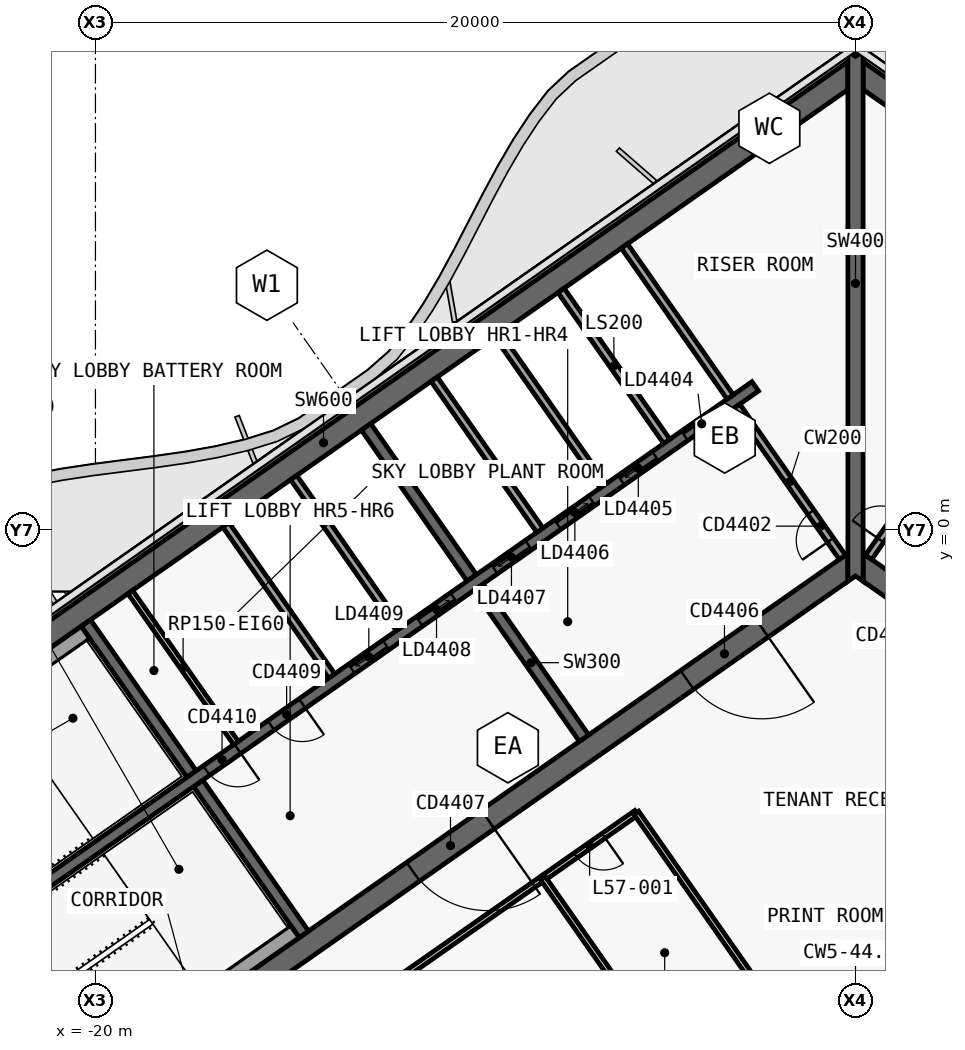
"""IFC4 building model, lengths in metres.
Left out: names, types, materials, properties, quantities, classifications, styles, units other than length and angle.
Written with IfcOpenShell. Run it as: python <this file> out.ifc"""

import sys

from ifc_helpers import new_model, si_unit, direction, frame, frame_2d, origin, place, context, subcontext, project, spatial, polyline, rectangle, outline, extrude, element, fill, save


model = new_model("IFC4")
c1 = context("Model", 3, precision=1e-05, world=origin(), true_north=direction((0.0, 1.0)))
c2 = subcontext(c1, "Body", "Model", "MODEL_VIEW")
j1 = project(units=[si_unit("LENGTHUNIT", "METRE"), si_unit("PLANEANGLEUNIT", "RADIAN")], contexts=[c1])
p1 = place(None, origin())
s1 = spatial("IfcSite", under=j1, at=p1, CompositionType="ELEMENT")
p2 = place(p1, origin())
s2 = spatial("IfcBuilding", under=s1, at=p2, CompositionType="ELEMENT")
p3 = place(p2, frame((0.0, 0.0, 244.9)))
s3 = spatial("IfcBuildingStorey", under=s2, at=p3, CompositionType="ELEMENT", Elevation=244.9)
p4 = place(p3, frame((-0.028, 12.066, 0.0), z_axis=(0.0, 0.0, 1.0), x_axis=(-0.819151382952, -0.573577380837, 0.0)))
e1 = element("IfcWall", 1, at=p4, inside=s3, PredefinedType="SHEAR", context=c2, shape_type="SweptSolid", body=[
    extrude(outline(polyline([(33.898, 0.3), (0.42, 0.3), (0.0, -0.3), (33.898, -0.3), (33.898, 0.3)])), origin(), (0.0, 0.0, 1.0), 3.9),
])
p5 = place(p3, frame((-0.028, -0.874, 0.0), z_axis=(0.0, 0.0, 1.0), x_axis=(-0.819150035022, -0.573579305871, 0.0)))
e2 = element("IfcWall", 2, at=p5, inside=s3, PredefinedType="SHEAR", context=c2, shape_type="SweptSolid", body=[
    extrude(outline(polyline([(26.476, 0.3), (0.42, 0.3), (0.0, -0.3), (26.476, -0.3), (26.476, 0.3)])), origin(), (0.0, 0.0, 1.0), 3.9),
])
p6 = place(p5, frame((2.976, 0.0, 0.0)))
e3 = element("IfcOpeningElement", 3, at=p6, cuts=e2, PredefinedType="OPENING", context=c2, shape_type="SweptSolid", body=[
    extrude(rectangle(XDim=2.4, YDim=2.1, at=frame_2d((1.2, 1.05))), frame((0.0, 0.31, 0.0), z_axis=(0.0, -1.0, 0.0), x_axis=(1.0, 0.0, 0.0)), (0.0, 0.0, 1.0), 0.62),
])
p7 = place(p5, frame((11.776, 0.0, 0.0)))
e4 = element("IfcOpeningElement", 4, at=p7, cuts=e2, PredefinedType="OPENING", context=c2, shape_type="SweptSolid", body=[
    extrude(rectangle(XDim=2.4, YDim=2.1, at=frame_2d((1.2, 1.05))), frame((0.0, 0.31, 0.0), z_axis=(0.0, -1.0, 0.0), x_axis=(1.0, 0.0, 0.0)), (0.0, 0.0, 1.0), 0.62),
])
p8 = place(p3, frame((-7.143, -5.49, 0.0), z_axis=(0.0, 0.0, 1.0), x_axis=(-0.573617744349, 0.819123118565, 0.0)))
e5 = element("IfcWall", 5, at=p8, inside=s3, PredefinedType="SHEAR", context=c2, shape_type="SweptSolid", body=[
    extrude(outline(polyline([(4.85, 0.15), (0.0, 0.15), (0.0, -0.15), (4.85, -0.15), (4.85, 0.15)])), origin(), (0.0, 0.0, 1.0), 3.9),
])
p9 = place(p3, frame((-10.097, -1.271, 0.0), z_axis=(0.0, 0.0, 1.0), x_axis=(-0.573560315113, 0.819163332265, 0.0)))
e6 = element("IfcWall", 6, at=p9, inside=s3, PredefinedType="SHEAR", context=c2, shape_type="SweptSolid", body=[
    extrude(outline(polyline([(4.85, -0.15), (4.85, 0.15), (0.0, 0.15), (0.0, -0.15), (4.85, -0.15)])), origin(), (0.0, 0.0, 1.0), 3.9),
])
p10 = place(p3, frame((-14.515, -10.652, 0.0), z_axis=(0.0, 0.0, 1.0), x_axis=(-0.573560315113, 0.819163332265, 0.0)))
e7 = element("IfcWall", 7, at=p10, inside=s3, PredefinedType="SHEAR", context=c2, shape_type="SweptSolid", body=[
    extrude(outline(polyline([(4.85, 0.15), (0.0, 0.15), (0.0, -0.15), (4.85, -0.15), (4.85, 0.15)])), origin(), (0.0, 0.0, 1.0), 3.9),
])
p11 = place(p3, frame((-17.469, -6.433, 0.0), z_axis=(0.0, 0.0, 1.0), x_axis=(-0.573594092424, 0.81913968109, 0.0)))
e8 = element("IfcWall", 8, at=p11, inside=s3, PredefinedType="SHEAR", context=c2, shape_type="SweptSolid", body=[
    extrude(outline(polyline([(4.85, -0.15), (4.85, 0.15), (0.0, 0.15), (0.0, -0.15), (4.85, -0.15)])), origin(), (0.0, 0.0, 1.0), 3.9),
])
p12 = place(p3, frame((-2.638, 3.768, 0.0), z_axis=(0.0, 0.0, 1.0), x_axis=(-0.819155014212, -0.573572194837, 0.0)))
e9 = element("IfcWall", 9, at=p12, inside=s3, PredefinedType="SHEAR", context=c2, shape_type="SweptSolid", body=[
    extrude(outline(polyline([(26.4, 0.15), (0.0, 0.15), (0.0, -0.15), (26.4, -0.15), (26.4, 0.15)])), origin(), (0.0, 0.0, 1.0), 3.9),
])
p13 = place(p12, frame((1.169, 0.0, 0.0)))
e10 = element("IfcOpeningElement", 10, at=p13, cuts=e9, PredefinedType="OPENING", context=c2, shape_type="SweptSolid", body=[
    extrude(rectangle(XDim=1.1, YDim=2.1, at=frame_2d((0.55, 1.05))), frame((0.0, 0.16, 0.0), z_axis=(0.0, -1.0, 0.0), x_axis=(1.0, 0.0, 0.0)), (0.0, 0.0, 1.0), 0.32),
])
p14 = place(p12, frame((3.206, 0.0, 0.0)))
e11 = element("IfcOpeningElement", 11, at=p14, cuts=e9, PredefinedType="OPENING", context=c2, shape_type="SweptSolid", body=[
    extrude(rectangle(XDim=1.1, YDim=2.1, at=frame_2d((0.55, 1.05))), frame((0.0, 0.16, 0.0), z_axis=(0.0, -1.0, 0.0), x_axis=(1.0, 0.0, 0.0)), (0.0, 0.0, 1.0), 0.32),
])
p15 = place(p12, frame((5.244, 0.0, 0.0)))
e12 = element("IfcOpeningElement", 12, at=p15, cuts=e9, PredefinedType="OPENING", context=c2, shape_type="SweptSolid", body=[
    extrude(rectangle(XDim=1.1, YDim=2.1, at=frame_2d((0.55, 1.05))), frame((0.0, 0.16, 0.0), z_axis=(0.0, -1.0, 0.0), x_axis=(1.0, 0.0, 0.0)), (0.0, 0.0, 1.0), 0.32),
])
p16 = place(p12, frame((7.281, 0.0, 0.0)))
e13 = element("IfcOpeningElement", 13, at=p16, cuts=e9, PredefinedType="OPENING", context=c2, shape_type="SweptSolid", body=[
    extrude(rectangle(XDim=1.1, YDim=2.1, at=frame_2d((0.55, 1.05))), frame((0.0, 0.16, 0.0), z_axis=(0.0, -1.0, 0.0), x_axis=(1.0, 0.0, 0.0)), (0.0, 0.0, 1.0), 0.32),
])
p17 = place(p12, frame((9.688, 0.0, 0.0)))
e14 = element("IfcOpeningElement", 14, at=p17, cuts=e9, PredefinedType="OPENING", context=c2, shape_type="SweptSolid", body=[
    extrude(rectangle(XDim=1.1, YDim=2.1, at=frame_2d((0.55, 1.05))), frame((0.0, 0.16, 0.0), z_axis=(0.0, -1.0, 0.0), x_axis=(1.0, 0.0, 0.0)), (0.0, 0.0, 1.0), 0.32),
])
p18 = place(p12, frame((11.863, 0.0, 0.0)))
e15 = element("IfcOpeningElement", 15, at=p18, cuts=e9, PredefinedType="OPENING", context=c2, shape_type="SweptSolid", body=[
    extrude(rectangle(XDim=1.1, YDim=2.1, at=frame_2d((0.55, 1.05))), frame((0.0, 0.16, 0.0), z_axis=(0.0, -1.0, 0.0), x_axis=(1.0, 0.0, 0.0)), (0.0, 0.0, 1.0), 0.32),
])
p19 = place(p12, frame((14.552, 0.0, 0.0)))
e16 = element("IfcOpeningElement", 16, at=p19, cuts=e9, PredefinedType="OPENING", context=c2, shape_type="SweptSolid", body=[
    extrude(rectangle(XDim=1.0, YDim=2.1, at=frame_2d((0.5, 1.05))), frame((0.0, 0.16, 0.0), z_axis=(0.0, -1.0, 0.0), x_axis=(1.0, 0.0, 0.0)), (0.0, 0.0, 1.0), 0.32),
])
p20 = place(p12, frame((16.627, 0.0, 0.0)))
e17 = element("IfcOpeningElement", 17, at=p20, cuts=e9, PredefinedType="OPENING", context=c2, shape_type="SweptSolid", body=[
    extrude(rectangle(XDim=1.0, YDim=2.1, at=frame_2d((0.5, 1.05))), frame((0.0, 0.16, 0.0), z_axis=(0.0, -1.0, 0.0), x_axis=(1.0, 0.0, 0.0)), (0.0, 0.0, 1.0), 0.32),
])
p21 = place(p3, frame((0.028, 12.066, 0.0), z_axis=(0.0, 0.0, 1.0), x_axis=(0.819151382952, -0.573577380837, 0.0)))
e18 = element("IfcWall", 18, at=p21, inside=s3, PredefinedType="SHEAR", context=c2, shape_type="SweptSolid", body=[
    extrude(outline(polyline([(33.898, 0.3), (0.0, 0.3), (0.42, -0.3), (33.898, -0.3), (33.898, 0.3)])), origin(), (0.0, 0.0, 1.0), 3.9),
])
p22 = place(p3, frame((0.028, -0.874, 0.0), z_axis=(0.0, 0.0, 1.0), x_axis=(0.819150035022, -0.573579305871, 0.0)))
e19 = element("IfcWall", 19, at=p22, inside=s3, PredefinedType="SHEAR", context=c2, shape_type="SweptSolid", body=[
    extrude(outline(polyline([(26.476, 0.3), (0.0, 0.3), (0.42, -0.3), (26.476, -0.3), (26.476, 0.3)])), origin(), (0.0, 0.0, 1.0), 3.9),
])
p23 = place(p22, frame((6.576, 0.0, 0.0)))
e20 = element("IfcOpeningElement", 20, at=p23, cuts=e19, PredefinedType="OPENING", context=c2, shape_type="SweptSolid", body=[
    extrude(rectangle(XDim=1.5, YDim=2.1, at=frame_2d((0.75, 1.05))), frame((0.0, 0.31, 0.0), z_axis=(0.0, -1.0, 0.0), x_axis=(1.0, 0.0, 0.0)), (0.0, 0.0, 1.0), 0.62),
])
p24 = place(p22, frame((12.226, 0.0, 0.0)))
e21 = element("IfcOpeningElement", 21, at=p24, cuts=e19, PredefinedType="OPENING", context=c2, shape_type="SweptSolid", body=[
    extrude(rectangle(XDim=1.5, YDim=2.1, at=frame_2d((0.75, 1.05))), frame((0.0, 0.31, 0.0), z_axis=(0.0, -1.0, 0.0), x_axis=(1.0, 0.0, 0.0)), (0.0, 0.0, 1.0), 0.62),
])
p25 = place(p3, frame((0.0, -1.361, 0.0), z_axis=(0.0, 0.0, 1.0), x_axis=(0.0, 1.0, 0.0)))
e22 = element("IfcWall", 22, at=p25, inside=s3, PredefinedType="SHEAR", context=c2, shape_type="SweptSolid", body=[
    extrude(outline(polyline([(0.14, 0.2), (0.0, 0.2), (0.14, 0.0), (0.0, -0.2), (0.14, -0.2), (1.012, -0.2), (12.94, -0.2), (13.813, -0.2), (13.893, -0.2), (13.933, -0.172), (13.813, 0.0), (13.933, 0.172), (13.893, 0.2), (13.813, 0.2), (12.94, 0.2), (1.012, 0.2), (0.14, 0.2)])), origin(), (0.0, 0.0, 1.0), 3.9),
])
p26 = place(p3, frame((-4.967, 2.321, 0.0), z_axis=(0.0, 0.0, 1.0), x_axis=(-0.573594092424, 0.81913968109, 0.0)))
e23 = element("IfcWall", 23, at=p26, inside=s3, PredefinedType="SOLIDWALL", context=c2, shape_type="SweptSolid", body=[
    extrude(rectangle(XDim=4.85, YDim=0.2, at=frame_2d((2.425, 0.0))), origin(), (0.0, 0.0, 1.0), 3.9),
])
p27 = place(p3, frame((-6.636, 1.152, 0.0), z_axis=(0.0, 0.0, 1.0), x_axis=(-0.573560315113, 0.819163332265, 0.0)))
e24 = element("IfcWall", 24, at=p27, inside=s3, PredefinedType="SOLIDWALL", context=c2, shape_type="SweptSolid", body=[
    extrude(rectangle(XDim=4.85, YDim=0.2, at=frame_2d((2.425, 0.0))), origin(), (0.0, 0.0, 1.0), 3.9),
])
p28 = place(p3, frame((-8.305, -0.017, 0.0), z_axis=(0.0, 0.0, 1.0), x_axis=(-0.573594092424, 0.81913968109, 0.0)))
e25 = element("IfcWall", 25, at=p28, inside=s3, PredefinedType="SOLIDWALL", context=c2, shape_type="SweptSolid", body=[
    extrude(rectangle(XDim=4.85, YDim=0.2, at=frame_2d((2.425, 0.0))), origin(), (0.0, 0.0, 1.0), 3.9),
])
p29 = place(p3, frame((-16.302, -5.616, 0.0), z_axis=(0.0, 0.0, 1.0), x_axis=(-0.573560315113, 0.819163332265, 0.0)))
e26 = element("IfcWall", 26, at=p29, inside=s3, PredefinedType="PARTITIONING", context=c2, shape_type="SweptSolid", body=[
    extrude(rectangle(XDim=4.85, YDim=0.15, at=frame_2d((2.425, 0.0))), origin(), (0.0, 0.0, 1.0), 3.62),
])
p30 = place(p3, frame((-12.001, -2.605, 0.0), z_axis=(0.0, 0.0, 1.0), x_axis=(-0.573560315113, 0.819163332265, 0.0)))
e27 = element("IfcWall", 27, at=p30, inside=s3, PredefinedType="SOLIDWALL", context=c2, shape_type="SweptSolid", body=[
    extrude(rectangle(XDim=4.85, YDim=0.2, at=frame_2d((2.425, 0.0))), origin(), (0.0, 0.0, 1.0), 3.9),
])
p31 = place(p3, frame((-13.783, -3.852, 0.0), z_axis=(0.0, 0.0, 1.0), x_axis=(-0.573594092424, 0.81913968109, 0.0)))
e28 = element("IfcWall", 28, at=p31, inside=s3, PredefinedType="SOLIDWALL", context=c2, shape_type="SweptSolid", body=[
    extrude(rectangle(XDim=4.85, YDim=0.2, at=frame_2d((2.425, 0.0))), origin(), (0.0, 0.0, 1.0), 3.9),
])
p32 = place(p3, frame((-20.259, -2.71, 0.0), z_axis=(0.0, 0.0, 1.0), x_axis=(-0.81914849389, -0.573581506813, 0.0)))
e29 = element("IfcWall", 29, at=p32, inside=s3, PredefinedType="SOLIDWALL", context=c2, shape_type="SweptSolid", body=[
    extrude(rectangle(XDim=8.25, YDim=0.4, at=frame_2d((4.125, 0.0))), origin(), (0.0, 0.0, 1.0), 3.62),
])
p33 = place(p3, frame((-14.753, -10.574, 0.0), z_axis=(0.0, 0.0, 1.0), x_axis=(-0.819158229677, -0.573567602601, 0.0)))
e30 = element("IfcWall", 30, at=p33, inside=s3, PredefinedType="SOLIDWALL", context=c2, shape_type="SweptSolid", body=[
    extrude(rectangle(XDim=8.25, YDim=0.4, at=frame_2d((4.125, 0.0))), origin(), (0.0, 0.0, 1.0), 3.62),
])
p34 = place(p3, frame((-0.344, -0.729, 0.0), z_axis=(0.0, 0.0, 1.0), x_axis=(-0.573560315113, 0.819163332265, 0.0)))
e31 = element("IfcWall", 31, at=p34, inside=s3, PredefinedType="SOLIDWALL", context=c2, shape_type="SweptSolid", body=[
    extrude(rectangle(XDim=4.85, YDim=0.2, at=frame_2d((2.425, 0.0))), origin(), (0.0, 0.0, 1.0), 3.62),
])
p35 = place(p34, frame((0.55, 0.0, 0.0)))
e32 = element("IfcOpeningElement", 32, at=p35, cuts=e31, PredefinedType="OPENING", context=c2, shape_type="SweptSolid", body=[
    extrude(rectangle(XDim=0.9, YDim=2.1, at=frame_2d((0.45, 1.05))), frame((0.0, 0.11, 0.0), z_axis=(0.0, -1.0, 0.0), x_axis=(1.0, 0.0, 0.0)), (0.0, 0.0, 1.0), 0.22),
])
p36 = place(p3, frame((-3.298, 3.49, 0.0), z_axis=(0.0, 0.0, 1.0), x_axis=(-0.573560315113, 0.819163332265, 0.0)))
e33 = element("IfcWall", 33, at=p36, inside=s3, PredefinedType="SOLIDWALL", context=c2, shape_type="SweptSolid", body=[
    extrude(rectangle(XDim=4.85, YDim=0.2, at=frame_2d((2.425, 0.0))), origin(), (0.0, 0.0, 1.0), 3.62),
])
p37 = place(p3, frame((0.344, -0.729, 0.0), z_axis=(0.0, 0.0, 1.0), x_axis=(0.573560315113, 0.819163332265, 0.0)))
e34 = element("IfcWall", 34, at=p37, inside=s3, PredefinedType="SOLIDWALL", context=c2, shape_type="SweptSolid", body=[
    extrude(rectangle(XDim=4.85, YDim=0.2, at=frame_2d((2.425, 0.0))), origin(), (0.0, 0.0, 1.0), 3.62),
])
p38 = place(p37, frame((0.55, 0.0, 0.0)))
e35 = element("IfcOpeningElement", 35, at=p38, cuts=e34, PredefinedType="OPENING", context=c2, shape_type="SweptSolid", body=[
    extrude(rectangle(XDim=0.9, YDim=2.1, at=frame_2d((0.45, 1.05))), frame((0.0, 0.11, 0.0), z_axis=(0.0, -1.0, 0.0), x_axis=(1.0, 0.0, 0.0)), (0.0, 0.0, 1.0), 0.22),
])
p39 = place(p3, frame((-5.766, -7.456, 0.0), z_axis=(0.0, 0.0, 1.0), x_axis=(-0.81915932427, -0.57356603932, 0.0)))
e36 = element("IfcWall", 36, at=p39, inside=s3, PredefinedType="PARTITIONING", context=c2, shape_type="SweptSolid", body=[
    extrude(rectangle(XDim=3.002, YDim=0.15, at=frame_2d((1.501, 0.0))), origin(), (0.0, 0.0, 1.0), 3.05),
])
p40 = place(p39, frame((1.051, 0.0, 0.0)))
e37 = element("IfcOpeningElement", 37, at=p40, cuts=e36, PredefinedType="OPENING", context=c2, shape_type="SweptSolid", body=[
    extrude(rectangle(XDim=0.9, YDim=2.1, at=frame_2d((0.45, 1.05))), frame((0.0, 0.085, 0.0), z_axis=(0.0, -1.0, 0.0), x_axis=(1.0, 0.0, 0.0)), (0.0, 0.0, 1.0), 0.17),
])
p41 = place(p3, frame((-8.222, -9.175, 0.0), z_axis=(0.0, 0.0, 1.0), x_axis=(-0.81915329441, -0.573574650989, 0.0)))
e38 = element("IfcWall", 38, at=p41, inside=s3, PredefinedType="PARTITIONING", context=c2, shape_type="SweptSolid", body=[
    extrude(rectangle(XDim=10.504, YDim=0.15, at=frame_2d((5.252, 0.0))), origin(), (0.0, 0.0, 1.0), 3.05),
])
p42 = place(p41, frame((4.452, 0.0, 0.0)))
e39 = element("IfcOpeningElement", 39, at=p42, cuts=e38, PredefinedType="OPENING", context=c2, shape_type="SweptSolid", body=[
    extrude(rectangle(XDim=1.6, YDim=2.1, at=frame_2d((0.8, 1.05))), frame((0.0, 0.085, 0.0), z_axis=(0.0, -1.0, 0.0), x_axis=(1.0, 0.0, 0.0)), (0.0, 0.0, 1.0), 0.17),
])
p43 = place(p3, frame((-1.849, -13.051, 0.0), z_axis=(0.0, 0.0, 1.0), x_axis=(-0.57357985571, 0.819149650018, 0.0)))
e40 = element("IfcWall", 40, at=p43, inside=s3, PredefinedType="PARTITIONING", context=c2, shape_type="SweptSolid", body=[
    extrude(rectangle(XDim=6.832, YDim=0.15, at=frame_2d((3.416, 0.0))), origin(), (0.0, 0.0, 1.0), 3.05),
])
p44 = place(p3, frame((-5.928, -12.455, 0.0), z_axis=(0.0, 0.0, 1.0), x_axis=(-0.573560601885, 0.819163131473, 0.0)))
e41 = element("IfcWall", 41, at=p44, inside=s3, PredefinedType="PARTITIONING", context=c2, shape_type="SweptSolid", body=[
    extrude(rectangle(XDim=4.002, YDim=0.15, at=frame_2d((2.001, 0.0))), origin(), (0.0, 0.0, 1.0), 3.62),
])
p45 = place(p13, origin())
e42 = element("IfcDoor", 42, at=p45, inside=s3, OperationType="SLIDING_TO_LEFT", PredefinedType="DOOR", context=c2, shape_type="SweptSolid", body=[
    extrude(rectangle(XDim=1.1, YDim=2.1, at=frame_2d((0.55, 1.05))), frame((0.0, 0.025, 0.0), z_axis=(0.0, -1.0, 0.0), x_axis=(1.0, 0.0, 0.0)), (0.0, 0.0, 1.0), 0.05),
])
fill(e10, e42)
p46 = place(p14, origin())
e43 = element("IfcDoor", 43, at=p46, inside=s3, OperationType="SLIDING_TO_RIGHT", PredefinedType="DOOR", context=c2, shape_type="SweptSolid", body=[
    extrude(rectangle(XDim=1.1, YDim=2.1, at=frame_2d((0.55, 1.05))), frame((0.0, 0.025, 0.0), z_axis=(0.0, -1.0, 0.0), x_axis=(1.0, 0.0, 0.0)), (0.0, 0.0, 1.0), 0.05),
])
fill(e11, e43)
p47 = place(p15, origin())
e44 = element("IfcDoor", 44, at=p47, inside=s3, OperationType="SLIDING_TO_LEFT", PredefinedType="DOOR", context=c2, shape_type="SweptSolid", body=[
    extrude(rectangle(XDim=1.1, YDim=2.1, at=frame_2d((0.55, 1.05))), frame((0.0, 0.025, 0.0), z_axis=(0.0, -1.0, 0.0), x_axis=(1.0, 0.0, 0.0)), (0.0, 0.0, 1.0), 0.05),
])
fill(e12, e44)
p48 = place(p16, origin())
e45 = element("IfcDoor", 45, at=p48, inside=s3, OperationType="SLIDING_TO_RIGHT", PredefinedType="DOOR", context=c2, shape_type="SweptSolid", body=[
    extrude(rectangle(XDim=1.1, YDim=2.1, at=frame_2d((0.55, 1.05))), frame((0.0, 0.025, 0.0), z_axis=(0.0, -1.0, 0.0), x_axis=(1.0, 0.0, 0.0)), (0.0, 0.0, 1.0), 0.05),
])
fill(e13, e45)
p49 = place(p17, origin())
e46 = element("IfcDoor", 46, at=p49, inside=s3, OperationType="SLIDING_TO_LEFT", PredefinedType="DOOR", context=c2, shape_type="SweptSolid", body=[
    extrude(rectangle(XDim=1.1, YDim=2.1, at=frame_2d((0.55, 1.05))), frame((0.0, 0.025, 0.0), z_axis=(0.0, -1.0, 0.0), x_axis=(1.0, 0.0, 0.0)), (0.0, 0.0, 1.0), 0.05),
])
fill(e14, e46)
p50 = place(p18, origin())
e47 = element("IfcDoor", 47, at=p50, inside=s3, OperationType="SLIDING_TO_RIGHT", PredefinedType="DOOR", context=c2, shape_type="SweptSolid", body=[
    extrude(rectangle(XDim=1.1, YDim=2.1, at=frame_2d((0.55, 1.05))), frame((0.0, 0.025, 0.0), z_axis=(0.0, -1.0, 0.0), x_axis=(1.0, 0.0, 0.0)), (0.0, 0.0, 1.0), 0.05),
])
fill(e15, e47)
p51 = place(p19, origin())
e48 = element("IfcDoor", 48, at=p51, inside=s3, OperationType="SINGLE_SWING_RIGHT", PredefinedType="DOOR", context=c2, shape_type="SweptSolid", body=[
    extrude(rectangle(XDim=1.0, YDim=2.1, at=frame_2d((0.5, 1.05))), frame((0.0, 0.025, 0.0), z_axis=(0.0, -1.0, 0.0), x_axis=(1.0, 0.0, 0.0)), (0.0, 0.0, 1.0), 0.05),
])
fill(e16, e48)
p52 = place(p20, origin())
e49 = element("IfcDoor", 49, at=p52, inside=s3, OperationType="SINGLE_SWING_RIGHT", PredefinedType="DOOR", context=c2, shape_type="SweptSolid", body=[
    extrude(rectangle(XDim=1.0, YDim=2.1, at=frame_2d((0.5, 1.05))), frame((0.0, 0.025, 0.0), z_axis=(0.0, -1.0, 0.0), x_axis=(1.0, 0.0, 0.0)), (0.0, 0.0, 1.0), 0.05),
])
fill(e17, e49)
p53 = place(p6, origin())
e50 = element("IfcDoor", 50, at=p53, inside=s3, OperationType="DOUBLE_DOOR_SINGLE_SWING", PredefinedType="DOOR", context=c2, shape_type="SweptSolid", body=[
    extrude(rectangle(XDim=2.4, YDim=2.1, at=frame_2d((1.2, 1.05))), frame((0.0, 0.025, 0.0), z_axis=(0.0, -1.0, 0.0), x_axis=(1.0, 0.0, 0.0)), (0.0, 0.0, 1.0), 0.05),
])
fill(e3, e50)
p54 = place(p7, origin())
e51 = element("IfcDoor", 51, at=p54, inside=s3, OperationType="DOUBLE_DOOR_SINGLE_SWING", PredefinedType="DOOR", context=c2, shape_type="SweptSolid", body=[
    extrude(rectangle(XDim=2.4, YDim=2.1, at=frame_2d((1.2, 1.05))), frame((0.0, 0.025, 0.0), z_axis=(0.0, -1.0, 0.0), x_axis=(1.0, 0.0, 0.0)), (0.0, 0.0, 1.0), 0.05),
])
fill(e4, e51)
p55 = place(p35, origin())
e52 = element("IfcDoor", 52, at=p55, inside=s3, OperationType="SINGLE_SWING_RIGHT", PredefinedType="DOOR", context=c2, shape_type="SweptSolid", body=[
    extrude(rectangle(XDim=0.9, YDim=2.1, at=frame_2d((0.45, 1.05))), frame((0.0, 0.025, 0.0), z_axis=(0.0, -1.0, 0.0), x_axis=(1.0, 0.0, 0.0)), (0.0, 0.0, 1.0), 0.05),
])
fill(e32, e52)
p56 = place(p38, origin())
e53 = element("IfcDoor", 53, at=p56, inside=s3, OperationType="SINGLE_SWING_RIGHT", PredefinedType="DOOR", context=c2, shape_type="SweptSolid", body=[
    extrude(rectangle(XDim=0.9, YDim=2.1, at=frame_2d((0.45, 1.05))), frame((0.0, 0.025, 0.0), z_axis=(0.0, -1.0, 0.0), x_axis=(1.0, 0.0, 0.0)), (0.0, 0.0, 1.0), 0.05),
])
fill(e35, e53)
p57 = place(p40, origin())
e54 = element("IfcDoor", 54, at=p57, inside=s3, OperationType="SINGLE_SWING_RIGHT", PredefinedType="DOOR", context=c2, shape_type="SweptSolid", body=[
    extrude(rectangle(XDim=0.9, YDim=2.1, at=frame_2d((0.45, 1.05))), frame((0.0, 0.025, 0.0), z_axis=(0.0, -1.0, 0.0), x_axis=(1.0, 0.0, 0.0)), (0.0, 0.0, 1.0), 0.05),
])
fill(e37, e54)
save(model, sys.argv[1])
